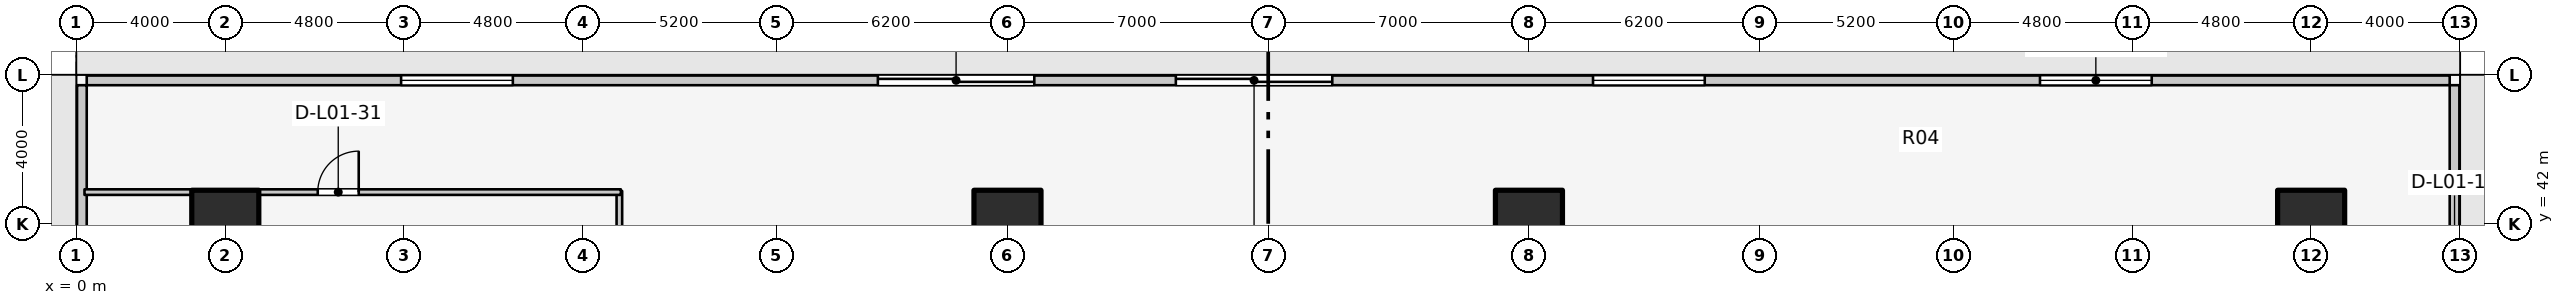
"""IFC4 building model, lengths in metres.
Left out: names, types, materials, properties, quantities, classifications, styles, units other than length and angle.
Written with IfcOpenShell. Run it as: python <this file> out.ifc"""

import sys

from ifc_helpers import new_model, si_unit, direction, frame, frame_2d, origin, origin_2d, place, context, subcontext, project, spatial, rectangle, extrude, element, fill, save


model = new_model("IFC4")
c1 = context("Model", 3, precision=1e-05, world=origin(), true_north=direction((0.0, 1.0)))
c2 = subcontext(c1, "Body", "Model", "MODEL_VIEW")
j1 = project(units=[si_unit("LENGTHUNIT", "METRE"), si_unit("PLANEANGLEUNIT", "RADIAN")], contexts=[c1])
p1 = place(None, origin())
s1 = spatial("IfcSite", under=j1, at=p1, CompositionType="ELEMENT")
p2 = place(p1, origin())
s2 = spatial("IfcBuilding", under=s1, at=p2, CompositionType="ELEMENT")
p3 = place(p2, origin())
s3 = spatial("IfcBuildingStorey", under=s2, at=p3, CompositionType="ELEMENT", Elevation=0.0)
for number, where, z_axis, x_axis in (
    (1, (60.0, 42.0, 0.0), (0.0, 0.0, 1.0), (1.0, 0.0, 0.0)),
    (2, (39.0, 42.0, 0.0), (0.0, 0.0, 1.0), (1.0, 0.0, 0.0)),
    (3, (25.0, 42.0, 0.0), (0.0, 0.0, 1.0), (1.0, 0.0, 0.0)),
    (4, (4.0, 42.0, 0.0), (0.0, 0.0, 1.0), (1.0, 0.0, 0.0)),
):
    element("IfcColumn", number, at=place(p3, frame(where, z_axis=z_axis, x_axis=x_axis)), inside=s3, PredefinedType="COLUMN", context=c2, shape_type="SweptSolid", body=[
        extrude(rectangle(XDim=1.8, YDim=1.8, at=origin_2d()), origin(), (0.0, 0.0, 1.0), 4.6),
    ])
p4 = place(p3, frame((63.85, 0.28, 0.0), z_axis=(0.0, 0.0, 1.0), x_axis=(0.0, 1.0, 0.0)))
e5 = element("IfcWall", 5, at=p4, inside=s3, PredefinedType="STANDARD", context=c2, shape_type="SweptSolid", body=[
    extrude(rectangle(XDim=45.44, YDim=0.26, at=frame_2d((22.72, 0.0))), origin(), (0.0, 0.0, 1.0), 4.28),
])
p5 = place(p4, frame((14.6, 0.0, 0.0)))
e6 = element("IfcOpeningElement", 6, at=p5, cuts=e5, PredefinedType="OPENING", context=c2, shape_type="SweptSolid", body=[
    extrude(rectangle(XDim=2.0, YDim=2.4, at=frame_2d((1.0, 1.2))), frame((0.0, 0.14, 0.0), z_axis=(0.0, -1.0, 0.0), x_axis=(1.0, 0.0, 0.0)), (0.0, 0.0, 1.0), 0.28),
])
p6 = place(p4, frame((22.0, 0.0, 0.0)))
e7 = element("IfcOpeningElement", 7, at=p6, cuts=e5, PredefinedType="OPENING", context=c2, shape_type="SweptSolid", body=[
    extrude(rectangle(XDim=2.0, YDim=2.4, at=frame_2d((1.0, 1.2))), frame((0.0, 0.14, 0.0), z_axis=(0.0, -1.0, 0.0), x_axis=(1.0, 0.0, 0.0)), (0.0, 0.0, 1.0), 0.28),
])
p7 = place(p4, frame((35.92, 0.0, 0.0)))
e8 = element("IfcOpeningElement", 8, at=p7, cuts=e5, PredefinedType="OPENING", context=c2, shape_type="SweptSolid", body=[
    extrude(rectangle(XDim=4.2, YDim=3.0, at=frame_2d((2.1, 1.5))), frame((0.0, 0.14, 0.0), z_axis=(0.0, -1.0, 0.0), x_axis=(1.0, 0.0, 0.0)), (0.0, 0.0, 1.0), 0.28),
])
p8 = place(p3, frame((63.72, 45.85, 0.0), z_axis=(0.0, 0.0, 1.0), x_axis=(-1.0, 0.0, 0.0)))
e9 = element("IfcWall", 9, at=p8, inside=s3, PredefinedType="STANDARD", context=c2, shape_type="SweptSolid", body=[
    extrude(rectangle(XDim=63.44, YDim=0.26, at=frame_2d((31.72, 0.0))), origin(), (0.0, 0.0, 1.0), 4.28),
])
p9 = place(p8, frame((8.0, 0.0, 0.9)))
e10 = element("IfcOpeningElement", 10, at=p9, cuts=e9, PredefinedType="OPENING", context=c2, shape_type="SweptSolid", body=[
    extrude(rectangle(XDim=3.0, YDim=2.4, at=frame_2d((1.5, 1.2))), frame((0.0, 0.14, 0.0), z_axis=(0.0, -1.0, 0.0), x_axis=(1.0, 0.0, 0.0)), (0.0, 0.0, 1.0), 0.28),
])
p10 = place(p8, frame((20.0, 0.0, 0.9)))
e11 = element("IfcOpeningElement", 11, at=p10, cuts=e9, PredefinedType="OPENING", context=c2, shape_type="SweptSolid", body=[
    extrude(rectangle(XDim=3.0, YDim=2.4, at=frame_2d((1.5, 1.2))), frame((0.0, 0.14, 0.0), z_axis=(0.0, -1.0, 0.0), x_axis=(1.0, 0.0, 0.0)), (0.0, 0.0, 1.0), 0.28),
])
p11 = place(p8, frame((52.0, 0.0, 0.9)))
e12 = element("IfcOpeningElement", 12, at=p11, cuts=e9, PredefinedType="OPENING", context=c2, shape_type="SweptSolid", body=[
    extrude(rectangle(XDim=3.0, YDim=2.4, at=frame_2d((1.5, 1.2))), frame((0.0, 0.14, 0.0), z_axis=(0.0, -1.0, 0.0), x_axis=(1.0, 0.0, 0.0)), (0.0, 0.0, 1.0), 0.28),
])
p12 = place(p8, frame((30.0, 0.0, 0.0)))
e13 = element("IfcOpeningElement", 13, at=p12, cuts=e9, PredefinedType="OPENING", context=c2, shape_type="SweptSolid", body=[
    extrude(rectangle(XDim=4.2, YDim=3.0, at=frame_2d((2.1, 1.5))), frame((0.0, 0.14, 0.0), z_axis=(0.0, -1.0, 0.0), x_axis=(1.0, 0.0, 0.0)), (0.0, 0.0, 1.0), 0.28),
])
p13 = place(p8, frame((38.0, 0.0, 0.0)))
e14 = element("IfcOpeningElement", 14, at=p13, cuts=e9, PredefinedType="OPENING", context=c2, shape_type="SweptSolid", body=[
    extrude(rectangle(XDim=4.2, YDim=3.0, at=frame_2d((2.1, 1.5))), frame((0.0, 0.14, 0.0), z_axis=(0.0, -1.0, 0.0), x_axis=(1.0, 0.0, 0.0)), (0.0, 0.0, 1.0), 0.28),
])
p14 = place(p3, frame((0.15, 45.72, 0.0), z_axis=(0.0, 0.0, 1.0), x_axis=(0.0, -1.0, 0.0)))
e15 = element("IfcWall", 15, at=p14, inside=s3, PredefinedType="STANDARD", context=c2, shape_type="SweptSolid", body=[
    extrude(rectangle(XDim=45.44, YDim=0.26, at=frame_2d((22.72, 0.0))), origin(), (0.0, 0.0, 1.0), 4.28),
])
p15 = place(p14, frame((29.8, 0.0, 0.0)))
e16 = element("IfcOpeningElement", 16, at=p15, cuts=e15, PredefinedType="OPENING", context=c2, shape_type="SweptSolid", body=[
    extrude(rectangle(XDim=2.0, YDim=2.4, at=frame_2d((1.0, 1.2))), frame((0.0, 0.14, 0.0), z_axis=(0.0, -1.0, 0.0), x_axis=(1.0, 0.0, 0.0)), (0.0, 0.0, 1.0), 0.28),
])
p16 = place(p14, frame((22.0, 0.0, 0.0)))
e17 = element("IfcOpeningElement", 17, at=p16, cuts=e15, PredefinedType="OPENING", context=c2, shape_type="SweptSolid", body=[
    extrude(rectangle(XDim=2.0, YDim=2.4, at=frame_2d((1.0, 1.2))), frame((0.0, 0.14, 0.0), z_axis=(0.0, -1.0, 0.0), x_axis=(1.0, 0.0, 0.0)), (0.0, 0.0, 1.0), 0.28),
])
p17 = place(p14, frame((36.5, 0.0, 0.0)))
e18 = element("IfcOpeningElement", 18, at=p17, cuts=e15, PredefinedType="OPENING", context=c2, shape_type="SweptSolid", body=[
    extrude(rectangle(XDim=2.0, YDim=2.4, at=frame_2d((1.0, 1.2))), frame((0.0, 0.14, 0.0), z_axis=(0.0, -1.0, 0.0), x_axis=(1.0, 0.0, 0.0)), (0.0, 0.0, 1.0), 0.28),
])
p18 = place(p14, frame((12.1, 0.0, 0.0)))
e19 = element("IfcOpeningElement", 19, at=p18, cuts=e15, PredefinedType="OPENING", context=c2, shape_type="SweptSolid", body=[
    extrude(rectangle(XDim=4.2, YDim=3.0, at=frame_2d((2.1, 1.5))), frame((0.0, 0.14, 0.0), z_axis=(0.0, -1.0, 0.0), x_axis=(1.0, 0.0, 0.0)), (0.0, 0.0, 1.0), 0.28),
])
p19 = place(p3, frame((14.58, 29.86, 0.0), z_axis=(0.0, 0.0, 1.0), x_axis=(0.0, 1.0, 0.0)))
e20 = element("IfcWall", 20, at=p19, inside=s3, PredefinedType="PARTITIONING", context=c2, shape_type="SweptSolid", body=[
    extrude(rectangle(XDim=13.02, YDim=0.15, at=frame_2d((6.51, 0.0))), origin(), (0.0, 0.0, 1.0), 3.3),
])
p20 = place(p3, frame((0.22, 42.85, 0.0), z_axis=(0.0, 0.0, 1.0), x_axis=(1.0, 0.0, 0.0)))
e21 = element("IfcWall", 21, at=p20, inside=s3, PredefinedType="PARTITIONING", context=c2, shape_type="SweptSolid", body=[
    extrude(rectangle(XDim=14.4, YDim=0.15, at=frame_2d((7.2, 0.0))), origin(), (0.0, 0.0, 1.0), 4.255),
])
p21 = place(p20, frame((6.262, 0.0, 0.0)))
e22 = element("IfcOpeningElement", 22, at=p21, cuts=e21, PredefinedType="OPENING", context=c2, shape_type="SweptSolid", body=[
    extrude(rectangle(XDim=1.1, YDim=2.1, at=frame_2d((0.55, 1.05))), frame((0.0, 0.085, 0.0), z_axis=(0.0, -1.0, 0.0), x_axis=(1.0, 0.0, 0.0)), (0.0, 0.0, 1.0), 0.17),
])
p22 = place(p9, origin())
e23 = element("IfcWindow", 23, at=p22, inside=s3, PartitioningType="SINGLE_PANEL", PredefinedType="WINDOW", context=c2, shape_type="SweptSolid", body=[
    extrude(rectangle(XDim=3.0, YDim=2.4, at=frame_2d((1.5, 1.2))), frame((0.0, 0.03, 0.0), z_axis=(0.0, -1.0, 0.0), x_axis=(1.0, 0.0, 0.0)), (0.0, 0.0, 1.0), 0.06),
])
fill(e10, e23)
p23 = place(p10, origin())
e24 = element("IfcWindow", 24, at=p23, inside=s3, PartitioningType="SINGLE_PANEL", PredefinedType="WINDOW", context=c2, shape_type="SweptSolid", body=[
    extrude(rectangle(XDim=3.0, YDim=2.4, at=frame_2d((1.5, 1.2))), frame((0.0, 0.03, 0.0), z_axis=(0.0, -1.0, 0.0), x_axis=(1.0, 0.0, 0.0)), (0.0, 0.0, 1.0), 0.06),
])
fill(e11, e24)
p24 = place(p11, origin())
e25 = element("IfcWindow", 25, at=p24, inside=s3, PartitioningType="SINGLE_PANEL", PredefinedType="WINDOW", context=c2, shape_type="SweptSolid", body=[
    extrude(rectangle(XDim=3.0, YDim=2.4, at=frame_2d((1.5, 1.2))), frame((0.0, 0.03, 0.0), z_axis=(0.0, -1.0, 0.0), x_axis=(1.0, 0.0, 0.0)), (0.0, 0.0, 1.0), 0.06),
])
fill(e12, e25)
p25 = place(p12, origin())
e26 = element("IfcDoor", 26, at=p25, inside=s3, OperationType="SLIDING_TO_LEFT", PredefinedType="GATE", context=c2, shape_type="SweptSolid", body=[
    extrude(rectangle(XDim=4.2, YDim=3.0, at=frame_2d((2.1, 1.5))), frame((0.0, 0.025, 0.0), z_axis=(0.0, -1.0, 0.0), x_axis=(1.0, 0.0, 0.0)), (0.0, 0.0, 1.0), 0.05),
])
fill(e13, e26)
p26 = place(p13, origin())
e27 = element("IfcDoor", 27, at=p26, inside=s3, OperationType="SLIDING_TO_LEFT", PredefinedType="GATE", context=c2, shape_type="SweptSolid", body=[
    extrude(rectangle(XDim=4.2, YDim=3.0, at=frame_2d((2.1, 1.5))), frame((0.0, 0.025, 0.0), z_axis=(0.0, -1.0, 0.0), x_axis=(1.0, 0.0, 0.0)), (0.0, 0.0, 1.0), 0.05),
])
fill(e14, e27)
p27 = place(p21, origin())
e28 = element("IfcDoor", 28, at=p27, inside=s3, OperationType="SINGLE_SWING_RIGHT", PredefinedType="DOOR", context=c2, shape_type="SweptSolid", body=[
    extrude(rectangle(XDim=1.1, YDim=2.1, at=frame_2d((0.55, 1.05))), frame((0.0, 0.025, 0.0), z_axis=(0.0, -1.0, 0.0), x_axis=(1.0, 0.0, 0.0)), (0.0, 0.0, 1.0), 0.05),
])
fill(e22, e28)
save(model, sys.argv[1])
